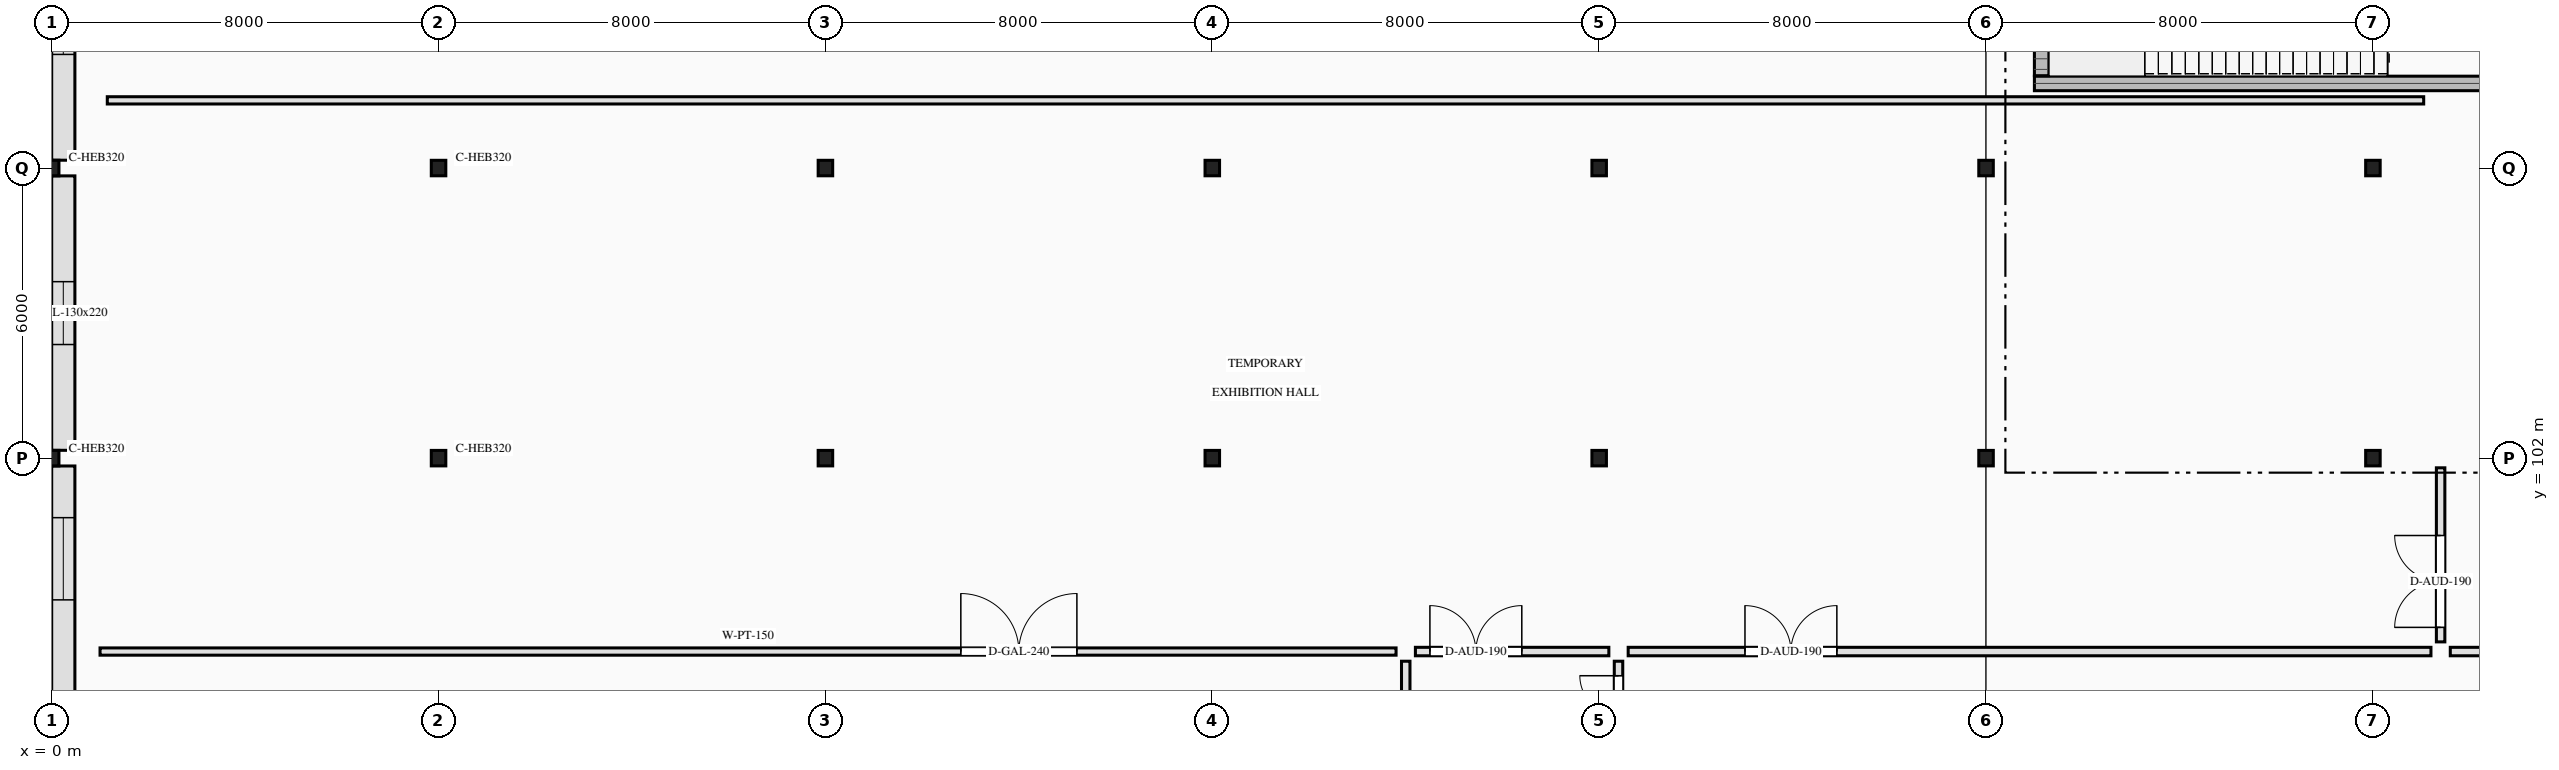
"""IFC4 building model, lengths in metres.
Left out: names, types, materials, properties, quantities, classifications, styles, units other than length and angle.
Written with IfcOpenShell. Run it as: python <this file> out.ifc"""

import sys

from ifc_helpers import new_model, si_unit, direction, frame, frame_2d, origin, origin_2d, place, context, subcontext, project, spatial, rectangle, i_section, extrude, element, fill, save


model = new_model("IFC4")
c1 = context("Model", 3, precision=1e-05, world=origin(), true_north=direction((0.0, 1.0)))
c2 = subcontext(c1, "Body", "Model", "MODEL_VIEW")
j1 = project(units=[si_unit("LENGTHUNIT", "METRE"), si_unit("PLANEANGLEUNIT", "RADIAN")], contexts=[c1])
p1 = place(None, origin())
s1 = spatial("IfcSite", under=j1, at=p1, CompositionType="ELEMENT")
p2 = place(p1, origin())
s2 = spatial("IfcBuilding", under=s1, at=p2, CompositionType="ELEMENT")
p3 = place(p2, origin())
s3 = spatial("IfcBuildingStorey", under=s2, at=p3, CompositionType="ELEMENT", Elevation=0.0)
p4 = place(p3, frame((41.0, 109.75, 0.0), z_axis=(0.0, 0.0, 1.0), x_axis=(1.0, 0.0, 0.0)))
e1 = element("IfcWall", 1, at=p4, inside=s3, PredefinedType="SHEAR", context=c2, shape_type="SweptSolid", body=[
    extrude(rectangle(XDim=10.0, YDim=0.3, at=frame_2d((5.0, 0.0))), origin(), (0.0, 0.0, 1.0), 5.4),
])
p5 = place(p3, frame((41.15, 109.91, 0.0), z_axis=(0.0, 0.0, 1.0), x_axis=(0.0, 1.0, 0.0)))
e2 = element("IfcWall", 2, at=p5, inside=s3, PredefinedType="SHEAR", context=c2, shape_type="SweptSolid", body=[
    extrude(rectangle(XDim=3.78, YDim=0.3, at=frame_2d((1.89, 0.0))), origin(), (0.0, 0.0, 1.0), 5.4),
])
for number, where, z_axis, x_axis in (
    (3, (0.0, 102.0, 0.0), (0.0, 0.0, 1.0), (1.0, 0.0, 0.0)),
    (4, (0.0, 108.0, 0.0), (0.0, 0.0, 1.0), (1.0, 0.0, 0.0)),
    (5, (8.0, 102.0, 0.0), (0.0, 0.0, 1.0), (1.0, 0.0, 0.0)),
    (6, (8.0, 108.0, 0.0), (0.0, 0.0, 1.0), (1.0, 0.0, 0.0)),
    (7, (16.0, 102.0, 0.0), (0.0, 0.0, 1.0), (1.0, 0.0, 0.0)),
    (8, (16.0, 108.0, 0.0), (0.0, 0.0, 1.0), (1.0, 0.0, 0.0)),
    (9, (24.0, 102.0, 0.0), (0.0, 0.0, 1.0), (1.0, 0.0, 0.0)),
    (10, (24.0, 108.0, 0.0), (0.0, 0.0, 1.0), (1.0, 0.0, 0.0)),
    (11, (32.0, 102.0, 0.0), (0.0, 0.0, 1.0), (1.0, 0.0, 0.0)),
    (12, (32.0, 108.0, 0.0), (0.0, 0.0, 1.0), (1.0, 0.0, 0.0)),
    (13, (40.0, 102.0, 0.0), (0.0, 0.0, 1.0), (1.0, 0.0, 0.0)),
    (14, (40.0, 108.0, 0.0), (0.0, 0.0, 1.0), (1.0, 0.0, 0.0)),
    (15, (48.0, 102.0, 0.0), (0.0, 0.0, 1.0), (1.0, 0.0, 0.0)),
    (16, (48.0, 108.0, 0.0), (0.0, 0.0, 1.0), (1.0, 0.0, 0.0)),
):
    element("IfcColumn", number, at=place(p3, frame(where, z_axis=z_axis, x_axis=x_axis)), inside=s3, PredefinedType="COLUMN", context=c2, shape_type="SweptSolid", body=[
        extrude(i_section(OverallWidth=0.3, OverallDepth=0.32, WebThickness=0.011, FlangeThickness=0.021, FilletRadius=0.027, at=origin_2d()), origin(), (0.0, 0.0, 1.0), 5.4),
    ])
p6 = place(p3, frame((0.24, 94.162, 0.0), z_axis=(0.0, 0.0, 1.0), x_axis=(0.0, 1.0, 0.0)))
e17 = element("IfcWall", 17, at=p6, inside=s3, PredefinedType="SOLIDWALL", context=c2, shape_type="SweptSolid", body=[
    extrude(rectangle(XDim=7.676, YDim=0.48, at=frame_2d((3.838, 0.0))), origin(), (0.0, 0.0, 1.0), 4.775),
])
p7 = place(p6, frame((1.169, 0.0, 0.85)))
e18 = element("IfcOpeningElement", 18, at=p7, cuts=e17, PredefinedType="OPENING", context=c2, shape_type="SweptSolid", body=[
    extrude(rectangle(XDim=1.5, YDim=2.4, at=frame_2d((0.75, 1.2))), frame((0.0, 0.25, 0.0), z_axis=(0.0, -1.0, 0.0), x_axis=(1.0, 0.0, 0.0)), (0.0, 0.0, 1.0), 0.5),
])
p8 = place(p6, frame((4.907, 0.0, 0.85)))
e19 = element("IfcOpeningElement", 19, at=p8, cuts=e17, PredefinedType="OPENING", context=c2, shape_type="SweptSolid", body=[
    extrude(rectangle(XDim=1.7, YDim=2.4, at=frame_2d((0.85, 1.2))), frame((0.0, 0.25, 0.0), z_axis=(0.0, -1.0, 0.0), x_axis=(1.0, 0.0, 0.0)), (0.0, 0.0, 1.0), 0.5),
])
p9 = place(p3, frame((0.24, 102.162, 0.0), z_axis=(0.0, 0.0, 1.0), x_axis=(0.0, 1.0, 0.0)))
e20 = element("IfcWall", 20, at=p9, inside=s3, PredefinedType="SOLIDWALL", context=c2, shape_type="SweptSolid", body=[
    extrude(rectangle(XDim=5.676, YDim=0.48, at=frame_2d((2.838, 0.0))), origin(), (0.0, 0.0, 1.0), 4.775),
])
p10 = place(p9, frame((2.188, 0.0, 0.85)))
e21 = element("IfcOpeningElement", 21, at=p10, cuts=e20, PredefinedType="OPENING", context=c2, shape_type="SweptSolid", body=[
    extrude(rectangle(XDim=1.3, YDim=2.2, at=frame_2d((0.65, 1.1))), frame((0.0, 0.25, 0.0), z_axis=(0.0, -1.0, 0.0), x_axis=(1.0, 0.0, 0.0)), (0.0, 0.0, 1.0), 0.5),
])
p11 = place(p3, frame((0.24, 108.162, 0.0), z_axis=(0.0, 0.0, 1.0), x_axis=(0.0, 1.0, 0.0)))
e22 = element("IfcWall", 22, at=p11, inside=s3, PredefinedType="SOLIDWALL", context=c2, shape_type="SweptSolid", body=[
    extrude(rectangle(XDim=5.676, YDim=0.48, at=frame_2d((2.838, 0.0))), origin(), (0.0, 0.0, 1.0), 4.775),
])
p12 = place(p11, frame((2.188, 0.0, 0.85)))
e23 = element("IfcOpeningElement", 23, at=p12, cuts=e22, PredefinedType="OPENING", context=c2, shape_type="SweptSolid", body=[
    extrude(rectangle(XDim=1.3, YDim=2.2, at=frame_2d((0.65, 1.1))), frame((0.0, 0.25, 0.0), z_axis=(0.0, -1.0, 0.0), x_axis=(1.0, 0.0, 0.0)), (0.0, 0.0, 1.0), 0.5),
])
p13 = place(p3, frame((49.6, 98.0, 0.0), z_axis=(0.0, 0.0, 1.0), x_axis=(1.0, 0.0, 0.0)))
e24 = element("IfcWall", 24, at=p13, inside=s3, PredefinedType="PARTITIONING", context=c2, shape_type="SweptSolid", body=[
    extrude(rectangle(XDim=5.9, YDim=0.175, at=frame_2d((2.95, 0.0))), origin(), (0.0, 0.0, 1.0), 5.16),
])
p14 = place(p13, frame((1.433, 0.0, 0.0)))
e25 = element("IfcOpeningElement", 25, at=p14, cuts=e24, PredefinedType="OPENING", context=c2, shape_type="SweptSolid", body=[
    extrude(rectangle(XDim=1.9, YDim=2.35, at=frame_2d((0.95, 1.175))), frame((0.0, 0.097, 0.0), z_axis=(0.0, -1.0, 0.0), x_axis=(1.0, 0.0, 0.0)), (0.0, 0.0, 1.0), 0.195),
])
p15 = place(p3, frame((49.4, 98.2, 0.0), z_axis=(0.0, 0.0, 1.0), x_axis=(0.0, 1.0, 0.0)))
e26 = element("IfcWall", 26, at=p15, inside=s3, PredefinedType="PARTITIONING", context=c2, shape_type="SweptSolid", body=[
    extrude(rectangle(XDim=3.6, YDim=0.175, at=frame_2d((1.8, 0.0))), origin(), (0.0, 0.0, 1.0), 5.16),
])
p16 = place(p15, frame((0.3, 0.0, 0.0)))
e27 = element("IfcOpeningElement", 27, at=p16, cuts=e26, PredefinedType="OPENING", context=c2, shape_type="SweptSolid", body=[
    extrude(rectangle(XDim=1.9, YDim=2.35, at=frame_2d((0.95, 1.175))), frame((0.0, 0.097, 0.0), z_axis=(0.0, -1.0, 0.0), x_axis=(1.0, 0.0, 0.0)), (0.0, 0.0, 1.0), 0.195),
])
p17 = place(p3, frame((32.4, 94.2, 0.0), z_axis=(0.0, 0.0, 1.0), x_axis=(0.0, 1.0, 0.0)))
e28 = element("IfcWall", 28, at=p17, inside=s3, PredefinedType="PARTITIONING", context=c2, shape_type="SweptSolid", body=[
    extrude(rectangle(XDim=3.6, YDim=0.175, at=frame_2d((1.8, 0.0))), origin(), (0.0, 0.0, 1.0), 5.16),
])
p18 = place(p17, frame((1.7, 0.0, 0.0)))
e29 = element("IfcOpeningElement", 29, at=p18, cuts=e28, PredefinedType="OPENING", context=c2, shape_type="SweptSolid", body=[
    extrude(rectangle(XDim=1.6, YDim=2.25, at=frame_2d((0.8, 1.125))), frame((0.0, 0.097, 0.0), z_axis=(0.0, -1.0, 0.0), x_axis=(1.0, 0.0, 0.0)), (0.0, 0.0, 1.0), 0.195),
])
p19 = place(p3, frame((32.6, 98.0, 0.0), z_axis=(0.0, 0.0, 1.0), x_axis=(1.0, 0.0, 0.0)))
e30 = element("IfcWall", 30, at=p19, inside=s3, PredefinedType="PARTITIONING", context=c2, shape_type="SweptSolid", body=[
    extrude(rectangle(XDim=16.6, YDim=0.175, at=frame_2d((8.3, 0.0))), origin(), (0.0, 0.0, 1.0), 5.16),
])
p20 = place(p19, frame((2.415, 0.0, 0.0)))
e31 = element("IfcOpeningElement", 31, at=p20, cuts=e30, PredefinedType="OPENING", context=c2, shape_type="SweptSolid", body=[
    extrude(rectangle(XDim=1.9, YDim=2.35, at=frame_2d((0.95, 1.175))), frame((0.0, 0.097, 0.0), z_axis=(0.0, -1.0, 0.0), x_axis=(1.0, 0.0, 0.0)), (0.0, 0.0, 1.0), 0.195),
])
p21 = place(p3, frame((28.0, 78.8, 0.0), z_axis=(0.0, 0.0, 1.0), x_axis=(0.0, 1.0, 0.0)))
e32 = element("IfcWall", 32, at=p21, inside=s3, PredefinedType="PARTITIONING", context=c2, shape_type="SweptSolid", body=[
    extrude(rectangle(XDim=19.0, YDim=0.175, at=frame_2d((9.5, 0.0))), origin(), (0.0, 0.0, 1.0), 5.16),
])
p22 = place(p21, frame((10.13, 0.0, 0.0)))
e33 = element("IfcOpeningElement", 33, at=p22, cuts=e32, PredefinedType="OPENING", context=c2, shape_type="SweptSolid", body=[
    extrude(rectangle(XDim=1.9, YDim=2.35, at=frame_2d((0.95, 1.175))), frame((0.0, 0.097, 0.0), z_axis=(0.0, -1.0, 0.0), x_axis=(1.0, 0.0, 0.0)), (0.0, 0.0, 1.0), 0.195),
])
p23 = place(p3, frame((28.2, 98.0, 0.0), z_axis=(0.0, 0.0, 1.0), x_axis=(1.0, 0.0, 0.0)))
e34 = element("IfcWall", 34, at=p23, inside=s3, PredefinedType="PARTITIONING", context=c2, shape_type="SweptSolid", body=[
    extrude(rectangle(XDim=4.0, YDim=0.175, at=frame_2d((2.0, 0.0))), origin(), (0.0, 0.0, 1.0), 5.16),
])
p24 = place(p23, frame((0.3, 0.0, 0.0)))
e35 = element("IfcOpeningElement", 35, at=p24, cuts=e34, PredefinedType="OPENING", context=c2, shape_type="SweptSolid", body=[
    extrude(rectangle(XDim=1.9, YDim=2.35, at=frame_2d((0.95, 1.175))), frame((0.0, 0.097, 0.0), z_axis=(0.0, -1.0, 0.0), x_axis=(1.0, 0.0, 0.0)), (0.0, 0.0, 1.0), 0.195),
])
p25 = place(p3, frame((1.0, 98.0, 0.0), z_axis=(0.0, 0.0, 1.0), x_axis=(1.0, 0.0, 0.0)))
e36 = element("IfcWall", 36, at=p25, inside=s3, PredefinedType="PARTITIONING", context=c2, shape_type="SweptSolid", body=[
    extrude(rectangle(XDim=26.8, YDim=0.15, at=frame_2d((13.4, 0.0))), origin(), (0.0, 0.0, 1.0), 5.1),
])
p26 = place(p25, frame((17.8, 0.0, 0.0)))
e37 = element("IfcOpeningElement", 37, at=p26, cuts=e36, PredefinedType="OPENING", context=c2, shape_type="SweptSolid", body=[
    extrude(rectangle(XDim=2.4, YDim=2.75, at=frame_2d((1.2, 1.375))), frame((0.0, 0.085, 0.0), z_axis=(0.0, -1.0, 0.0), x_axis=(1.0, 0.0, 0.0)), (0.0, 0.0, 1.0), 0.17),
])
p27 = place(p3, frame((1.15, 109.4, 0.0), z_axis=(0.0, 0.0, 1.0), x_axis=(1.0, 0.0, 0.0)))
e38 = element("IfcWall", 38, at=p27, inside=s3, PredefinedType="PARTITIONING", context=c2, shape_type="SweptSolid", body=[
    extrude(rectangle(XDim=47.9, YDim=0.15, at=frame_2d((23.95, 0.0))), origin(), (0.0, 0.0, 1.0), 5.16),
])
p28 = place(p8, origin())
e39 = element("IfcWindow", 39, at=p28, inside=s3, PartitioningType="DOUBLE_PANEL_VERTICAL", PredefinedType="WINDOW", context=c2, shape_type="SweptSolid", body=[
    extrude(rectangle(XDim=1.7, YDim=2.4, at=frame_2d((0.85, 1.2))), frame((0.0, 0.03, 0.0), z_axis=(0.0, -1.0, 0.0), x_axis=(1.0, 0.0, 0.0)), (0.0, 0.0, 1.0), 0.06),
])
fill(e19, e39)
p29 = place(p10, origin())
e40 = element("IfcWindow", 40, at=p29, inside=s3, PartitioningType="SINGLE_PANEL", PredefinedType="WINDOW", context=c2, shape_type="SweptSolid", body=[
    extrude(rectangle(XDim=1.3, YDim=2.2, at=frame_2d((0.65, 1.1))), frame((0.0, 0.03, 0.0), z_axis=(0.0, -1.0, 0.0), x_axis=(1.0, 0.0, 0.0)), (0.0, 0.0, 1.0), 0.06),
])
fill(e21, e40)
p30 = place(p12, origin())
e41 = element("IfcWindow", 41, at=p30, inside=s3, PartitioningType="SINGLE_PANEL", PredefinedType="WINDOW", context=c2, shape_type="SweptSolid", body=[
    extrude(rectangle(XDim=1.3, YDim=2.2, at=frame_2d((0.65, 1.1))), frame((0.0, 0.03, 0.0), z_axis=(0.0, -1.0, 0.0), x_axis=(1.0, 0.0, 0.0)), (0.0, 0.0, 1.0), 0.06),
])
fill(e23, e41)
p31 = place(p16, origin())
e42 = element("IfcDoor", 42, at=p31, inside=s3, OperationType="DOUBLE_DOOR_SINGLE_SWING", PredefinedType="DOOR", context=c2, shape_type="SweptSolid", body=[
    extrude(rectangle(XDim=1.9, YDim=2.35, at=frame_2d((0.95, 1.175))), frame((0.0, 0.025, 0.0), z_axis=(0.0, -1.0, 0.0), x_axis=(1.0, 0.0, 0.0)), (0.0, 0.0, 1.0), 0.05),
])
fill(e27, e42)
p32 = place(p18, origin())
e43 = element("IfcDoor", 43, at=p32, inside=s3, OperationType="DOUBLE_DOOR_SINGLE_SWING", PredefinedType="DOOR", context=c2, shape_type="SweptSolid", body=[
    extrude(rectangle(XDim=1.6, YDim=2.25, at=frame_2d((0.8, 1.125))), frame((0.0, 0.025, 0.0), z_axis=(0.0, -1.0, 0.0), x_axis=(1.0, 0.0, 0.0)), (0.0, 0.0, 1.0), 0.05),
])
fill(e29, e43)
p33 = place(p20, origin())
e44 = element("IfcDoor", 44, at=p33, inside=s3, OperationType="DOUBLE_DOOR_SINGLE_SWING", PredefinedType="DOOR", context=c2, shape_type="SweptSolid", body=[
    extrude(rectangle(XDim=1.9, YDim=2.35, at=frame_2d((0.95, 1.175))), frame((0.0, 0.025, 0.0), z_axis=(0.0, -1.0, 0.0), x_axis=(1.0, 0.0, 0.0)), (0.0, 0.0, 1.0), 0.05),
])
fill(e31, e44)
p34 = place(p24, origin())
e45 = element("IfcDoor", 45, at=p34, inside=s3, OperationType="DOUBLE_DOOR_SINGLE_SWING", PredefinedType="DOOR", context=c2, shape_type="SweptSolid", body=[
    extrude(rectangle(XDim=1.9, YDim=2.35, at=frame_2d((0.95, 1.175))), frame((0.0, 0.025, 0.0), z_axis=(0.0, -1.0, 0.0), x_axis=(1.0, 0.0, 0.0)), (0.0, 0.0, 1.0), 0.05),
])
fill(e35, e45)
p35 = place(p26, origin())
e46 = element("IfcDoor", 46, at=p35, inside=s3, OperationType="DOUBLE_DOOR_DOUBLE_SWING", PredefinedType="DOOR", context=c2, shape_type="SweptSolid", body=[
    extrude(rectangle(XDim=2.4, YDim=2.75, at=frame_2d((1.2, 1.375))), frame((0.0, 0.025, 0.0), z_axis=(0.0, -1.0, 0.0), x_axis=(1.0, 0.0, 0.0)), (0.0, 0.0, 1.0), 0.05),
])
fill(e37, e46)
save(model, sys.argv[1])
